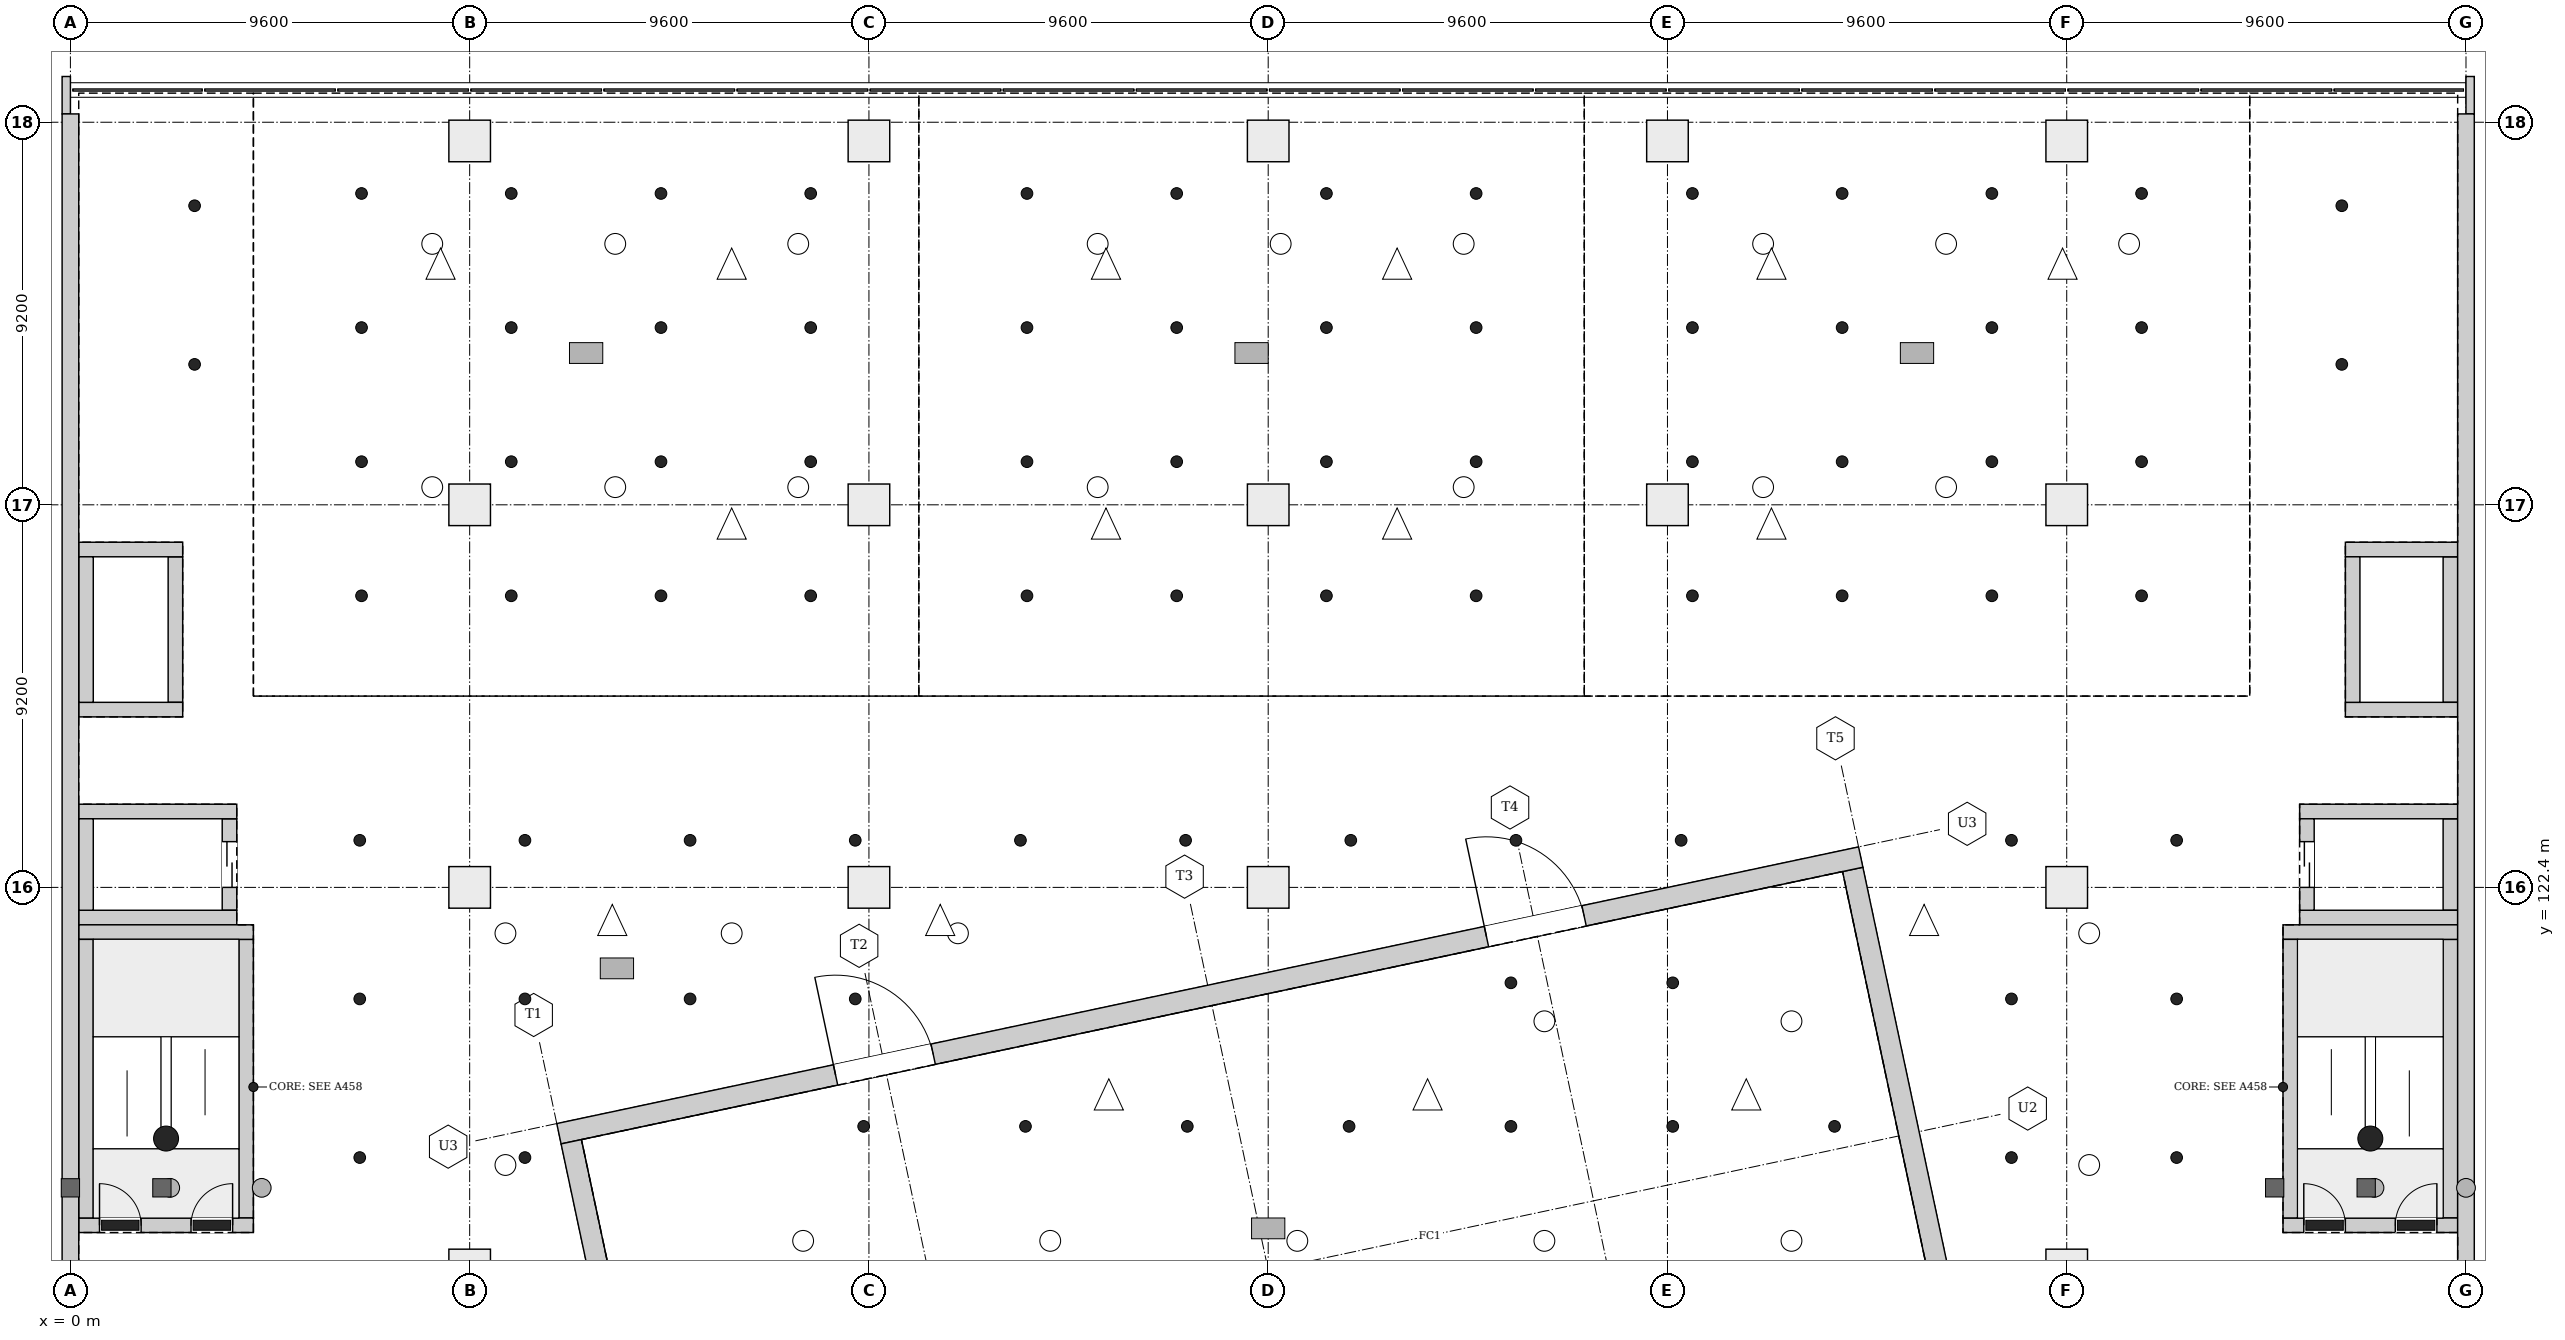
"""IFC4 building model, lengths in metres.
Left out: names, types, materials, properties, quantities, classifications, styles, units other than length and angle.
Written with IfcOpenShell. Run it as: python <this file> out.ifc"""

import sys

from ifc_helpers import new_model, si_unit, direction, frame, frame_2d, origin, origin_2d, place, context, subcontext, project, spatial, rectangle, extrude, element, fill, save


model = new_model("IFC4")
c1 = context("Model", 3, precision=1e-05, world=origin(), true_north=direction((0.0, 1.0)))
c2 = subcontext(c1, "Body", "Model", "MODEL_VIEW")
j1 = project(units=[si_unit("LENGTHUNIT", "METRE"), si_unit("PLANEANGLEUNIT", "RADIAN")], contexts=[c1])
p1 = place(None, origin())
s1 = spatial("IfcSite", under=j1, at=p1, CompositionType="ELEMENT")
p2 = place(p1, origin())
s2 = spatial("IfcBuilding", under=s1, at=p2, CompositionType="ELEMENT")
p3 = place(p2, frame((0.0, 0.0, 21.7)))
s3 = spatial("IfcBuildingStorey", under=s2, at=p3, CompositionType="ELEMENT", Elevation=21.7)
for number, where, z_axis, x_axis in (
    (1, (0.0, 94.12, 0.0), (0.0, 0.0, 1.0), (0.0, 1.0, 0.0)),
    (2, (57.6, 94.12, 0.0), (0.0, 0.0, 1.0), (0.0, 1.0, 0.0)),
):
    element("IfcWall", number, at=place(p3, frame(where, z_axis=z_axis, x_axis=x_axis)), inside=s3, PredefinedType="SHEAR", context=c2, shape_type="SweptSolid", body=[
        extrude(rectangle(XDim=46.88, YDim=0.4, at=frame_2d((23.44, 0.0))), origin(), (0.0, 0.0, 1.0), 5.0),
    ])
p4 = place(p3, frame((0.2, 114.275, 0.0), z_axis=(0.0, 0.0, 1.0), x_axis=(1.0, 0.0, 0.0)))
e3 = element("IfcWall", 3, at=p4, inside=s3, PredefinedType="SHEAR", context=c2, shape_type="SweptSolid", body=[
    extrude(rectangle(XDim=4.2, YDim=0.35, at=frame_2d((2.1, 0.0))), origin(), (0.0, 0.0, 1.0), 5.0),
])
p5 = place(p4, frame((0.5, 0.0, 0.0)))
e4 = element("IfcOpeningElement", 4, at=p5, cuts=e3, PredefinedType="OPENING", context=c2, shape_type="SweptSolid", body=[
    extrude(rectangle(XDim=1.0, YDim=2.1, at=frame_2d((0.5, 1.05))), frame((0.0, 0.185, 0.0), z_axis=(0.0, -1.0, 0.0), x_axis=(1.0, 0.0, 0.0)), (0.0, 0.0, 1.0), 0.37),
])
p6 = place(p4, frame((2.7, 0.0, 0.0)))
e5 = element("IfcOpeningElement", 5, at=p6, cuts=e3, PredefinedType="OPENING", context=c2, shape_type="SweptSolid", body=[
    extrude(rectangle(XDim=1.0, YDim=2.1, at=frame_2d((0.5, 1.05))), frame((0.0, 0.185, 0.0), z_axis=(0.0, -1.0, 0.0), x_axis=(1.0, 0.0, 0.0)), (0.0, 0.0, 1.0), 0.37),
])
p7 = place(p3, frame((0.2, 121.325, 0.0), z_axis=(0.0, 0.0, 1.0), x_axis=(1.0, 0.0, 0.0)))
e6 = element("IfcWall", 6, at=p7, inside=s3, PredefinedType="SHEAR", context=c2, shape_type="SweptSolid", body=[
    extrude(rectangle(XDim=4.2, YDim=0.35, at=frame_2d((2.1, 0.0))), origin(), (0.0, 0.0, 1.0), 5.0),
])
for number, where, z_axis, x_axis in (
    (7, (0.375, 114.45, 0.0), (0.0, 0.0, 1.0), (0.0, 1.0, 0.0)),
    (8, (4.225, 114.45, 0.0), (0.0, 0.0, 1.0), (0.0, 1.0, 0.0)),
):
    element("IfcWall", number, at=place(p3, frame(where, z_axis=z_axis, x_axis=x_axis)), inside=s3, PredefinedType="SHEAR", context=c2, shape_type="SweptSolid", body=[
        extrude(rectangle(XDim=6.7, YDim=0.35, at=frame_2d((3.35, 0.0))), origin(), (0.0, 0.0, 1.0), 5.0),
    ])
p8 = place(p3, frame((53.2, 114.275, 0.0), z_axis=(0.0, 0.0, 1.0), x_axis=(1.0, 0.0, 0.0)))
e9 = element("IfcWall", 9, at=p8, inside=s3, PredefinedType="SHEAR", context=c2, shape_type="SweptSolid", body=[
    extrude(rectangle(XDim=4.2, YDim=0.35, at=frame_2d((2.1, 0.0))), origin(), (0.0, 0.0, 1.0), 5.0),
])
p9 = place(p8, frame((0.5, 0.0, 0.0)))
e10 = element("IfcOpeningElement", 10, at=p9, cuts=e9, PredefinedType="OPENING", context=c2, shape_type="SweptSolid", body=[
    extrude(rectangle(XDim=1.0, YDim=2.1, at=frame_2d((0.5, 1.05))), frame((0.0, 0.185, 0.0), z_axis=(0.0, -1.0, 0.0), x_axis=(1.0, 0.0, 0.0)), (0.0, 0.0, 1.0), 0.37),
])
p10 = place(p8, frame((2.7, 0.0, 0.0)))
e11 = element("IfcOpeningElement", 11, at=p10, cuts=e9, PredefinedType="OPENING", context=c2, shape_type="SweptSolid", body=[
    extrude(rectangle(XDim=1.0, YDim=2.1, at=frame_2d((0.5, 1.05))), frame((0.0, 0.185, 0.0), z_axis=(0.0, -1.0, 0.0), x_axis=(1.0, 0.0, 0.0)), (0.0, 0.0, 1.0), 0.37),
])
p11 = place(p3, frame((53.2, 121.325, 0.0), z_axis=(0.0, 0.0, 1.0), x_axis=(1.0, 0.0, 0.0)))
e12 = element("IfcWall", 12, at=p11, inside=s3, PredefinedType="SHEAR", context=c2, shape_type="SweptSolid", body=[
    extrude(rectangle(XDim=4.2, YDim=0.35, at=frame_2d((2.1, 0.0))), origin(), (0.0, 0.0, 1.0), 5.0),
])
for number, where, z_axis, x_axis in (
    (13, (53.375, 114.45, 0.0), (0.0, 0.0, 1.0), (0.0, 1.0, 0.0)),
    (14, (57.225, 114.45, 0.0), (0.0, 0.0, 1.0), (0.0, 1.0, 0.0)),
):
    element("IfcWall", number, at=place(p3, frame(where, z_axis=z_axis, x_axis=x_axis)), inside=s3, PredefinedType="SHEAR", context=c2, shape_type="SweptSolid", body=[
        extrude(rectangle(XDim=6.7, YDim=0.35, at=frame_2d((3.35, 0.0))), origin(), (0.0, 0.0, 1.0), 5.0),
    ])
for number, where, z_axis, x_axis in (
    (15, (0.2, 121.675, 0.0), (0.0, 0.0, 1.0), (1.0, 0.0, 0.0)),
    (16, (0.2, 124.225, 0.0), (0.0, 0.0, 1.0), (1.0, 0.0, 0.0)),
):
    element("IfcWall", number, at=place(p3, frame(where, z_axis=z_axis, x_axis=x_axis)), inside=s3, PredefinedType="SHEAR", context=c2, shape_type="SweptSolid", body=[
        extrude(rectangle(XDim=3.8, YDim=0.35, at=frame_2d((1.9, 0.0))), origin(), (0.0, 0.0, 1.0), 5.0),
    ])
p12 = place(p3, frame((0.375, 121.85, 0.0), z_axis=(0.0, 0.0, 1.0), x_axis=(0.0, 1.0, 0.0)))
e17 = element("IfcWall", 17, at=p12, inside=s3, PredefinedType="SHEAR", context=c2, shape_type="SweptSolid", body=[
    extrude(rectangle(XDim=2.2, YDim=0.35, at=frame_2d((1.1, 0.0))), origin(), (0.0, 0.0, 1.0), 5.0),
])
p13 = place(p3, frame((3.825, 121.85, 0.0), z_axis=(0.0, 0.0, 1.0), x_axis=(0.0, 1.0, 0.0)))
e18 = element("IfcWall", 18, at=p13, inside=s3, PredefinedType="SHEAR", context=c2, shape_type="SweptSolid", body=[
    extrude(rectangle(XDim=2.2, YDim=0.35, at=frame_2d((1.1, 0.0))), origin(), (0.0, 0.0, 1.0), 5.0),
])
p14 = place(p13, frame((0.55, 0.0, 0.0)))
e19 = element("IfcOpeningElement", 19, at=p14, cuts=e18, PredefinedType="OPENING", context=c2, shape_type="SweptSolid", body=[
    extrude(rectangle(XDim=1.1, YDim=2.1, at=frame_2d((0.55, 1.05))), frame((0.0, 0.185, 0.0), z_axis=(0.0, -1.0, 0.0), x_axis=(1.0, 0.0, 0.0)), (0.0, 0.0, 1.0), 0.37),
])
for number, where, z_axis, x_axis in (
    (20, (53.6, 121.675, 0.0), (0.0, 0.0, 1.0), (1.0, 0.0, 0.0)),
    (21, (53.6, 124.225, 0.0), (0.0, 0.0, 1.0), (1.0, 0.0, 0.0)),
):
    element("IfcWall", number, at=place(p3, frame(where, z_axis=z_axis, x_axis=x_axis)), inside=s3, PredefinedType="SHEAR", context=c2, shape_type="SweptSolid", body=[
        extrude(rectangle(XDim=3.8, YDim=0.35, at=frame_2d((1.9, 0.0))), origin(), (0.0, 0.0, 1.0), 5.0),
    ])
p15 = place(p3, frame((53.775, 121.85, 0.0), z_axis=(0.0, 0.0, 1.0), x_axis=(0.0, 1.0, 0.0)))
e22 = element("IfcWall", 22, at=p15, inside=s3, PredefinedType="SHEAR", context=c2, shape_type="SweptSolid", body=[
    extrude(rectangle(XDim=2.2, YDim=0.35, at=frame_2d((1.1, 0.0))), origin(), (0.0, 0.0, 1.0), 5.0),
])
p16 = place(p15, frame((0.55, 0.0, 0.0)))
e23 = element("IfcOpeningElement", 23, at=p16, cuts=e22, PredefinedType="OPENING", context=c2, shape_type="SweptSolid", body=[
    extrude(rectangle(XDim=1.1, YDim=2.1, at=frame_2d((0.55, 1.05))), frame((0.0, 0.185, 0.0), z_axis=(0.0, -1.0, 0.0), x_axis=(1.0, 0.0, 0.0)), (0.0, 0.0, 1.0), 0.37),
])
p17 = place(p3, frame((57.225, 121.85, 0.0), z_axis=(0.0, 0.0, 1.0), x_axis=(0.0, 1.0, 0.0)))
e24 = element("IfcWall", 24, at=p17, inside=s3, PredefinedType="SHEAR", context=c2, shape_type="SweptSolid", body=[
    extrude(rectangle(XDim=2.2, YDim=0.35, at=frame_2d((1.1, 0.0))), origin(), (0.0, 0.0, 1.0), 5.0),
])
for number, where, z_axis, x_axis in (
    (25, (0.2, 126.675, 0.0), (0.0, 0.0, 1.0), (1.0, 0.0, 0.0)),
    (26, (0.2, 130.525, 0.0), (0.0, 0.0, 1.0), (1.0, 0.0, 0.0)),
):
    element("IfcWall", number, at=place(p3, frame(where, z_axis=z_axis, x_axis=x_axis)), inside=s3, PredefinedType="SHEAR", context=c2, shape_type="SweptSolid", body=[
        extrude(rectangle(XDim=2.5, YDim=0.35, at=frame_2d((1.25, 0.0))), origin(), (0.0, 0.0, 1.0), 5.0),
    ])
for number, where, z_axis, x_axis in (
    (27, (0.375, 126.85, 0.0), (0.0, 0.0, 1.0), (0.0, 1.0, 0.0)),
    (28, (2.525, 126.85, 0.0), (0.0, 0.0, 1.0), (0.0, 1.0, 0.0)),
):
    element("IfcWall", number, at=place(p3, frame(where, z_axis=z_axis, x_axis=x_axis)), inside=s3, PredefinedType="SHEAR", context=c2, shape_type="SweptSolid", body=[
        extrude(rectangle(XDim=3.5, YDim=0.35, at=frame_2d((1.75, 0.0))), origin(), (0.0, 0.0, 1.0), 5.0),
    ])
for number, where, z_axis, x_axis in (
    (29, (54.7, 126.675, 0.0), (0.0, 0.0, 1.0), (1.0, 0.0, 0.0)),
    (30, (54.7, 130.525, 0.0), (0.0, 0.0, 1.0), (1.0, 0.0, 0.0)),
):
    element("IfcWall", number, at=place(p3, frame(where, z_axis=z_axis, x_axis=x_axis)), inside=s3, PredefinedType="SHEAR", context=c2, shape_type="SweptSolid", body=[
        extrude(rectangle(XDim=2.7, YDim=0.35, at=frame_2d((1.35, 0.0))), origin(), (0.0, 0.0, 1.0), 5.0),
    ])
for number, where, z_axis, x_axis in (
    (31, (54.875, 126.85, 0.0), (0.0, 0.0, 1.0), (0.0, 1.0, 0.0)),
    (32, (57.225, 126.85, 0.0), (0.0, 0.0, 1.0), (0.0, 1.0, 0.0)),
):
    element("IfcWall", number, at=place(p3, frame(where, z_axis=z_axis, x_axis=x_axis)), inside=s3, PredefinedType="SHEAR", context=c2, shape_type="SweptSolid", body=[
        extrude(rectangle(XDim=3.5, YDim=0.35, at=frame_2d((1.75, 0.0))), origin(), (0.0, 0.0, 1.0), 5.0),
    ])
p18 = place(p3, frame((11.746, 116.476, 0.0), z_axis=(0.0, 0.0, 1.0), x_axis=(0.978146420121, 0.207917245089, 0.0)))
e33 = element("IfcWall", 33, at=p18, inside=s3, PredefinedType="SHEAR", context=c2, shape_type="SweptSolid", body=[
    extrude(rectangle(XDim=32.0, YDim=0.5, at=frame_2d((16.0, 0.0))), origin(), (0.0, 0.0, 1.0), 5.0),
])
p19 = place(p18, frame((6.8, 0.0, 0.0)))
e34 = element("IfcOpeningElement", 34, at=p19, cuts=e33, PredefinedType="OPENING", context=c2, shape_type="SweptSolid", body=[
    extrude(rectangle(XDim=2.4, YDim=2.4, at=frame_2d((1.2, 1.2))), frame((0.0, 0.26, 0.0), z_axis=(0.0, -1.0, 0.0), x_axis=(1.0, 0.0, 0.0)), (0.0, 0.0, 1.0), 0.52),
])
p20 = place(p18, frame((22.8, 0.0, 0.0)))
e35 = element("IfcOpeningElement", 35, at=p20, cuts=e33, PredefinedType="OPENING", context=c2, shape_type="SweptSolid", body=[
    extrude(rectangle(XDim=2.4, YDim=2.4, at=frame_2d((1.2, 1.2))), frame((0.0, 0.26, 0.0), z_axis=(0.0, -1.0, 0.0), x_axis=(1.0, 0.0, 0.0)), (0.0, 0.0, 1.0), 0.52),
])
p21 = place(p3, frame((14.746, 103.567, 0.0), z_axis=(0.0, 0.0, 1.0), x_axis=(-0.207911537827, 0.978147633253, 0.0)))
e36 = element("IfcWall", 36, at=p21, inside=s3, PredefinedType="SHEAR", context=c2, shape_type="SweptSolid", body=[
    extrude(rectangle(XDim=13.0, YDim=0.5, at=frame_2d((6.5, 0.0))), origin(), (0.0, 0.0, 1.0), 5.0),
])
p22 = place(p3, frame((45.557, 110.117, 0.0), z_axis=(0.0, 0.0, 1.0), x_axis=(-0.207915357117, 0.978146821431, 0.0)))
e37 = element("IfcWall", 37, at=p22, inside=s3, PredefinedType="SHEAR", context=c2, shape_type="SweptSolid", body=[
    extrude(rectangle(XDim=13.0, YDim=0.5, at=frame_2d((6.5, 0.0))), origin(), (0.0, 0.0, 1.0), 5.0),
])
for number, where, z_axis, x_axis in (
    (38, (9.6, 113.2, 0.0), (0.0, 0.0, 1.0), (1.0, 0.0, 0.0)),
    (39, (48.0, 113.2, 0.0), (0.0, 0.0, 1.0), (1.0, 0.0, 0.0)),
    (40, (9.6, 122.4, 0.0), (0.0, 0.0, 1.0), (1.0, 0.0, 0.0)),
    (41, (19.2, 122.4, 0.0), (0.0, 0.0, 1.0), (1.0, 0.0, 0.0)),
    (42, (28.8, 122.4, 0.0), (0.0, 0.0, 1.0), (1.0, 0.0, 0.0)),
    (43, (48.0, 122.4, 0.0), (0.0, 0.0, 1.0), (1.0, 0.0, 0.0)),
    (44, (9.6, 131.6, 0.0), (0.0, 0.0, 1.0), (1.0, 0.0, 0.0)),
    (45, (19.2, 131.6, 0.0), (0.0, 0.0, 1.0), (1.0, 0.0, 0.0)),
    (46, (28.8, 131.6, 0.0), (0.0, 0.0, 1.0), (1.0, 0.0, 0.0)),
    (47, (38.4, 131.6, 0.0), (0.0, 0.0, 1.0), (1.0, 0.0, 0.0)),
    (48, (48.0, 131.6, 0.0), (0.0, 0.0, 1.0), (1.0, 0.0, 0.0)),
    (49, (9.6, 140.35, 0.0), (0.0, 0.0, 1.0), (1.0, 0.0, 0.0)),
    (50, (19.2, 140.35, 0.0), (0.0, 0.0, 1.0), (1.0, 0.0, 0.0)),
    (51, (28.8, 140.35, 0.0), (0.0, 0.0, 1.0), (1.0, 0.0, 0.0)),
    (52, (38.4, 140.35, 0.0), (0.0, 0.0, 1.0), (1.0, 0.0, 0.0)),
    (53, (48.0, 140.35, 0.0), (0.0, 0.0, 1.0), (1.0, 0.0, 0.0)),
):
    element("IfcColumn", number, at=place(p3, frame(where, z_axis=z_axis, x_axis=x_axis)), inside=s3, PredefinedType="COLUMN", context=c2, shape_type="SweptSolid", body=[
        extrude(rectangle(XDim=1.0, YDim=1.0, at=origin_2d()), origin(), (0.0, 0.0, 1.0), 5.0),
    ])
for number, where, z_axis, x_axis in (
    (54, (-0.099, 141.9, 0.0), (0.0, 0.0, 1.0), (0.0, -1.0, 0.0)),
    (55, (57.699, 141.0, 0.0), (0.0, 0.0, 1.0), (0.0, 1.0, 0.0)),
):
    element("IfcWall", number, at=place(p3, frame(where, z_axis=z_axis, x_axis=x_axis)), inside=s3, PredefinedType="ELEMENTEDWALL", context=c2, shape_type="SweptSolid", body=[
        extrude(rectangle(XDim=0.9, YDim=0.2, at=frame_2d((0.45, 0.0))), origin(), (0.0, 0.0, 1.0), 4.65),
    ])
p23 = place(p5, origin())
e56 = element("IfcDoor", 56, at=p23, inside=s3, OperationType="SINGLE_SWING_RIGHT", PredefinedType="DOOR", context=c2, shape_type="SweptSolid", body=[
    extrude(rectangle(XDim=1.0, YDim=2.1, at=frame_2d((0.5, 1.05))), frame((0.0, 0.025, 0.0), z_axis=(0.0, -1.0, 0.0), x_axis=(1.0, 0.0, 0.0)), (0.0, 0.0, 1.0), 0.05),
])
fill(e4, e56)
p24 = place(p6, origin())
e57 = element("IfcDoor", 57, at=p24, inside=s3, OperationType="SINGLE_SWING_LEFT", PredefinedType="DOOR", context=c2, shape_type="SweptSolid", body=[
    extrude(rectangle(XDim=1.0, YDim=2.1, at=frame_2d((0.5, 1.05))), frame((0.0, 0.025, 0.0), z_axis=(0.0, -1.0, 0.0), x_axis=(1.0, 0.0, 0.0)), (0.0, 0.0, 1.0), 0.05),
])
fill(e5, e57)
p25 = place(p9, origin())
e58 = element("IfcDoor", 58, at=p25, inside=s3, OperationType="SINGLE_SWING_RIGHT", PredefinedType="DOOR", context=c2, shape_type="SweptSolid", body=[
    extrude(rectangle(XDim=1.0, YDim=2.1, at=frame_2d((0.5, 1.05))), frame((0.0, 0.025, 0.0), z_axis=(0.0, -1.0, 0.0), x_axis=(1.0, 0.0, 0.0)), (0.0, 0.0, 1.0), 0.05),
])
fill(e10, e58)
p26 = place(p10, origin())
e59 = element("IfcDoor", 59, at=p26, inside=s3, OperationType="SINGLE_SWING_LEFT", PredefinedType="DOOR", context=c2, shape_type="SweptSolid", body=[
    extrude(rectangle(XDim=1.0, YDim=2.1, at=frame_2d((0.5, 1.05))), frame((0.0, 0.025, 0.0), z_axis=(0.0, -1.0, 0.0), x_axis=(1.0, 0.0, 0.0)), (0.0, 0.0, 1.0), 0.05),
])
fill(e11, e59)
p27 = place(p14, origin())
e60 = element("IfcDoor", 60, at=p27, inside=s3, OperationType="DOUBLE_DOOR_SLIDING", PredefinedType="DOOR", context=c2, shape_type="SweptSolid", body=[
    extrude(rectangle(XDim=1.1, YDim=2.1, at=frame_2d((0.55, 1.05))), frame((0.0, 0.025, 0.0), z_axis=(0.0, -1.0, 0.0), x_axis=(1.0, 0.0, 0.0)), (0.0, 0.0, 1.0), 0.05),
])
fill(e19, e60)
p28 = place(p16, origin())
e61 = element("IfcDoor", 61, at=p28, inside=s3, OperationType="DOUBLE_DOOR_SLIDING", PredefinedType="DOOR", context=c2, shape_type="SweptSolid", body=[
    extrude(rectangle(XDim=1.1, YDim=2.1, at=frame_2d((0.55, 1.05))), frame((0.0, 0.025, 0.0), z_axis=(0.0, -1.0, 0.0), x_axis=(1.0, 0.0, 0.0)), (0.0, 0.0, 1.0), 0.05),
])
fill(e23, e61)
p29 = place(p19, origin())
e62 = element("IfcDoor", 62, at=p29, inside=s3, OperationType="DOUBLE_DOOR_SINGLE_SWING", PredefinedType="DOOR", context=c2, shape_type="SweptSolid", body=[
    extrude(rectangle(XDim=2.4, YDim=2.4, at=frame_2d((1.2, 1.2))), frame((0.0, 0.025, 0.0), z_axis=(0.0, -1.0, 0.0), x_axis=(1.0, 0.0, 0.0)), (0.0, 0.0, 1.0), 0.05),
])
fill(e34, e62)
p30 = place(p20, origin())
e63 = element("IfcDoor", 63, at=p30, inside=s3, OperationType="DOUBLE_DOOR_SINGLE_SWING", PredefinedType="DOOR", context=c2, shape_type="SweptSolid", body=[
    extrude(rectangle(XDim=2.4, YDim=2.4, at=frame_2d((1.2, 1.2))), frame((0.0, 0.025, 0.0), z_axis=(0.0, -1.0, 0.0), x_axis=(1.0, 0.0, 0.0)), (0.0, 0.0, 1.0), 0.05),
])
fill(e35, e63)
save(model, sys.argv[1])
